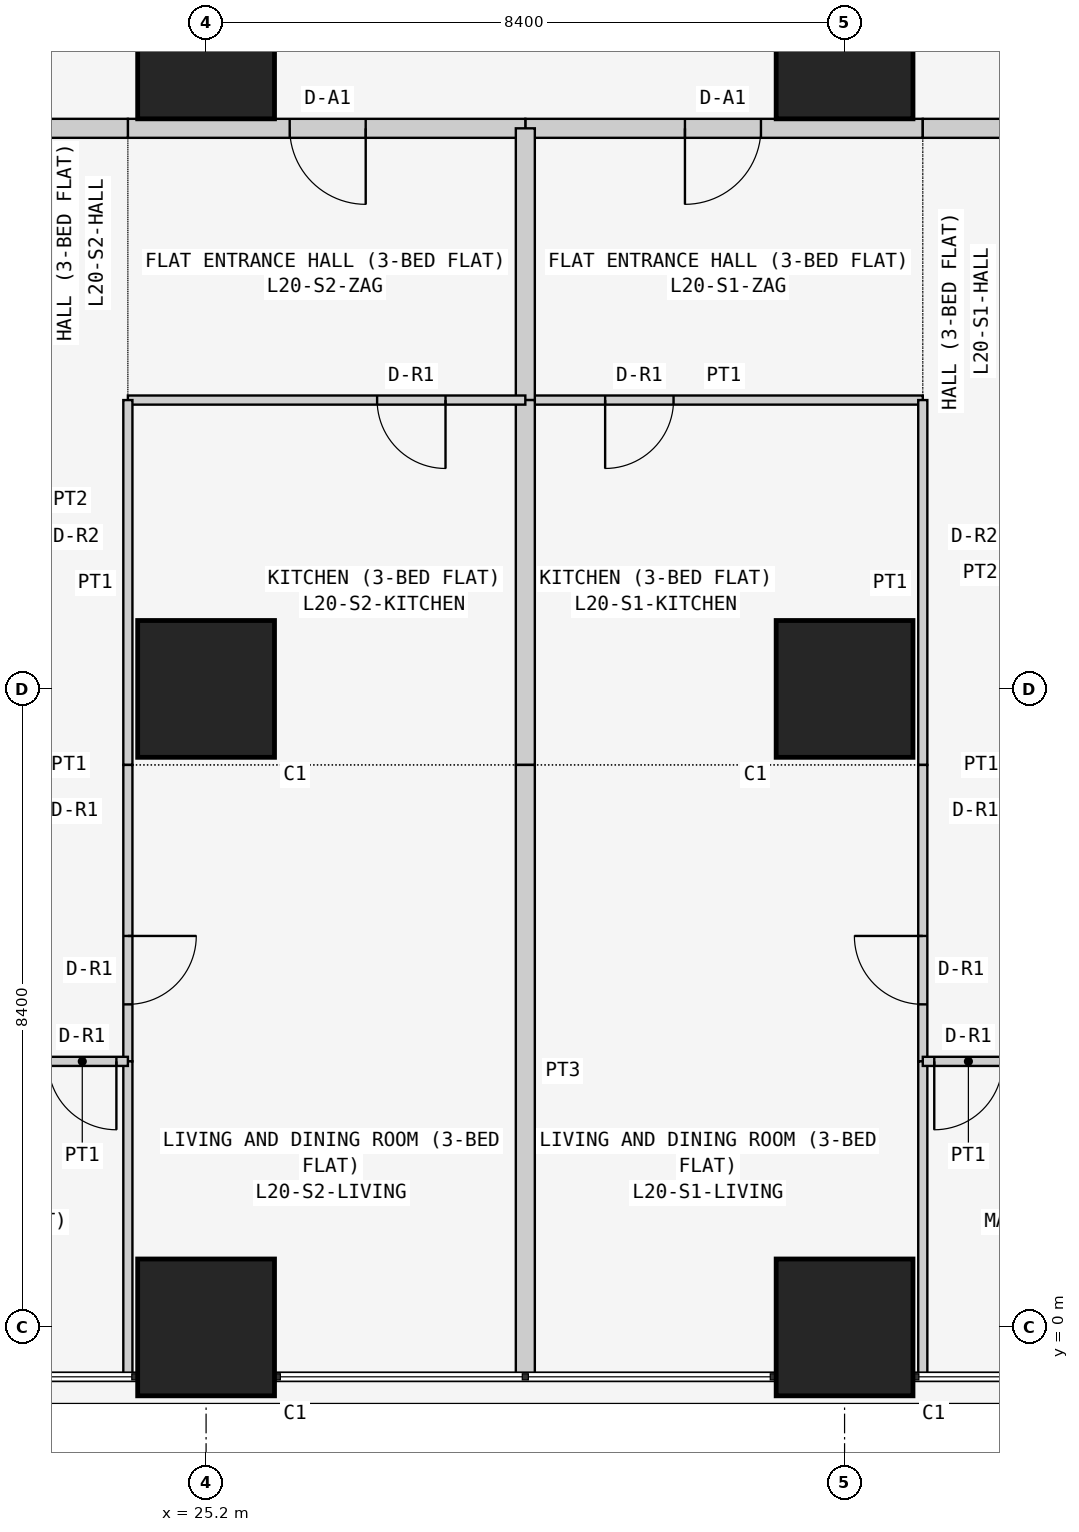
"""IFC4 building model, lengths in metres.
Left out: names, types, materials, properties, quantities, classifications, styles, units other than length and angle.
Written with IfcOpenShell. Run it as: python <this file> out.ifc"""

import sys

from ifc_helpers import new_model, si_unit, direction, frame, frame_2d, origin, origin_2d, place, context, subcontext, project, spatial, rectangle, extrude, element, fill, save


model = new_model("IFC4")
c1 = context("Model", 3, precision=1e-05, world=origin(), true_north=direction((0.0, 1.0)))
c2 = subcontext(c1, "Body", "Model", "MODEL_VIEW")
j1 = project(units=[si_unit("LENGTHUNIT", "METRE"), si_unit("PLANEANGLEUNIT", "RADIAN")], contexts=[c1])
p1 = place(None, origin())
s1 = spatial("IfcSite", under=j1, at=p1, CompositionType="ELEMENT")
p2 = place(p1, origin())
s2 = spatial("IfcBuilding", under=s1, at=p2, CompositionType="ELEMENT")
p3 = place(p2, frame((0.0, 0.0, 81.3)))
s3 = spatial("IfcBuildingStorey", under=s2, at=p3, CompositionType="ELEMENT", Elevation=81.3)
for number, where, z_axis, x_axis in (
    (1, (25.2, 0.0, 0.0), (0.0, 0.0, 1.0), (1.0, 0.0, 0.0)),
    (2, (25.2, 8.4, 0.0), (0.0, 0.0, 1.0), (1.0, 0.0, 0.0)),
    (3, (25.2, 16.8, 0.0), (0.0, 0.0, 1.0), (1.0, 0.0, 0.0)),
    (4, (33.6, 0.0, 0.0), (0.0, 0.0, 1.0), (1.0, 0.0, 0.0)),
    (5, (33.6, 8.4, 0.0), (0.0, 0.0, 1.0), (1.0, 0.0, 0.0)),
    (6, (33.6, 16.8, 0.0), (0.0, 0.0, 1.0), (1.0, 0.0, 0.0)),
):
    element("IfcColumn", number, at=place(p3, frame(where, z_axis=z_axis, x_axis=x_axis)), inside=s3, PredefinedType="COLUMN", context=c2, shape_type="SweptSolid", body=[
        extrude(rectangle(XDim=1.8, YDim=1.8, at=origin_2d()), origin(), (0.0, 0.0, 1.0), 3.6),
    ])
p4 = place(p3, frame((34.629, 15.775, 0.0), z_axis=(0.0, 0.0, 1.0), x_axis=(-1.0, 0.0, 0.0)))
e7 = element("IfcWall", 7, at=p4, inside=s3, PredefinedType="PARTITIONING", context=c2, shape_type="SweptSolid", body=[
    extrude(rectangle(XDim=5.229, YDim=0.25, at=frame_2d((2.615, 0.0))), origin(), (0.0, 0.0, 1.0), 3.45),
])
p5 = place(p4, frame((2.129, 0.0, 0.0)))
e8 = element("IfcOpeningElement", 8, at=p5, cuts=e7, PredefinedType="OPENING", context=c2, shape_type="SweptSolid", body=[
    extrude(rectangle(XDim=1.0, YDim=2.1, at=frame_2d((0.5, 1.05))), frame((0.0, 0.135, 0.0), z_axis=(0.0, -1.0, 0.0), x_axis=(1.0, 0.0, 0.0)), (0.0, 0.0, 1.0), 0.27),
])
p6 = place(p3, frame((35.829, 15.775, 0.0), z_axis=(0.0, 0.0, 1.0), x_axis=(-1.0, 0.0, 0.0)))
e9 = element("IfcWall", 9, at=p6, inside=s3, PredefinedType="PARTITIONING", context=c2, shape_type="SweptSolid", body=[
    extrude(rectangle(XDim=1.2, YDim=0.25, at=frame_2d((0.6, 0.0))), origin(), (0.0, 0.0, 1.0), 3.45),
])
p7 = place(p3, frame((29.4, 15.775, 0.0), z_axis=(0.0, 0.0, 1.0), x_axis=(-1.0, 0.0, 0.0)))
e10 = element("IfcWall", 10, at=p7, inside=s3, PredefinedType="PARTITIONING", context=c2, shape_type="SweptSolid", body=[
    extrude(rectangle(XDim=5.229, YDim=0.25, at=frame_2d((2.615, 0.0))), origin(), (0.0, 0.0, 1.0), 3.45),
])
p8 = place(p7, frame((2.1, 0.0, 0.0)))
e11 = element("IfcOpeningElement", 11, at=p8, cuts=e10, PredefinedType="OPENING", context=c2, shape_type="SweptSolid", body=[
    extrude(rectangle(XDim=1.0, YDim=2.1, at=frame_2d((0.5, 1.05))), frame((0.0, 0.135, 0.0), z_axis=(0.0, -1.0, 0.0), x_axis=(1.0, 0.0, 0.0)), (0.0, 0.0, 1.0), 0.27),
])
p9 = place(p3, frame((24.171, 15.775, 0.0), z_axis=(0.0, 0.0, 1.0), x_axis=(-1.0, 0.0, 0.0)))
e12 = element("IfcWall", 12, at=p9, inside=s3, PredefinedType="PARTITIONING", context=c2, shape_type="SweptSolid", body=[
    extrude(rectangle(XDim=1.2, YDim=0.25, at=frame_2d((0.6, 0.0))), origin(), (0.0, 0.0, 1.0), 3.45),
])
p10 = place(p3, frame((29.4, 12.2, 0.0), z_axis=(0.0, 0.0, 1.0), x_axis=(1.0, 0.0, 0.0)))
e13 = element("IfcWall", 13, at=p10, inside=s3, PredefinedType="PARTITIONING", context=c2, shape_type="SweptSolid", body=[
    extrude(rectangle(XDim=5.229, YDim=0.12, at=frame_2d((2.615, 0.0))), origin(), (0.0, 0.0, 1.0), 3.45),
])
p11 = place(p10, frame((1.05, 0.0, 0.0)))
e14 = element("IfcOpeningElement", 14, at=p11, cuts=e13, PredefinedType="OPENING", context=c2, shape_type="SweptSolid", body=[
    extrude(rectangle(XDim=0.9, YDim=2.1, at=frame_2d((0.45, 1.05))), frame((0.0, 0.07, 0.0), z_axis=(0.0, -1.0, 0.0), x_axis=(1.0, 0.0, 0.0)), (0.0, 0.0, 1.0), 0.14),
])
p12 = place(p3, frame((29.4, 15.775, 0.0), z_axis=(0.0, 0.0, 1.0), x_axis=(0.0, -1.0, 0.0)))
e15 = element("IfcWall", 15, at=p12, inside=s3, PredefinedType="PARTITIONING", context=c2, shape_type="SweptSolid", body=[
    extrude(rectangle(XDim=3.575, YDim=0.25, at=frame_2d((1.788, 0.0))), origin(), (0.0, 0.0, 1.0), 2.848),
])
p13 = place(p3, frame((34.629, 7.4, 0.0), z_axis=(0.0, 0.0, 1.0), x_axis=(0.0, 1.0, 0.0)))
e16 = element("IfcWall", 16, at=p13, inside=s3, PredefinedType="PARTITIONING", context=c2, shape_type="SweptSolid", body=[
    extrude(rectangle(XDim=4.8, YDim=0.12, at=frame_2d((2.4, 0.0))), origin(), (0.0, 0.0, 1.0), 3.45),
])
p14 = place(p3, frame((29.4, 12.2, 0.0), z_axis=(0.0, 0.0, 1.0), x_axis=(0.0, -1.0, 0.0)))
e17 = element("IfcWall", 17, at=p14, inside=s3, PredefinedType="PARTITIONING", context=c2, shape_type="SweptSolid", body=[
    extrude(rectangle(XDim=4.8, YDim=0.25, at=frame_2d((2.4, 0.0))), origin(), (0.0, 0.0, 1.0), 2.848),
])
p15 = place(p3, frame((34.629, 3.5, 0.0), z_axis=(0.0, 0.0, 1.0), x_axis=(0.0, 1.0, 0.0)))
e18 = element("IfcWall", 18, at=p15, inside=s3, PredefinedType="PARTITIONING", context=c2, shape_type="SweptSolid", body=[
    extrude(rectangle(XDim=3.9, YDim=0.12, at=frame_2d((1.95, 0.0))), origin(), (0.0, 0.0, 1.0), 3.45),
])
p16 = place(p15, frame((0.75, 0.0, 0.0)))
e19 = element("IfcOpeningElement", 19, at=p16, cuts=e18, PredefinedType="OPENING", context=c2, shape_type="SweptSolid", body=[
    extrude(rectangle(XDim=0.9, YDim=2.1, at=frame_2d((0.45, 1.05))), frame((0.0, 0.07, 0.0), z_axis=(0.0, -1.0, 0.0), x_axis=(1.0, 0.0, 0.0)), (0.0, 0.0, 1.0), 0.14),
])
p17 = place(p3, frame((34.629, -0.65, 0.0), z_axis=(0.0, 0.0, 1.0), x_axis=(0.0, 1.0, 0.0)))
e20 = element("IfcWall", 20, at=p17, inside=s3, PredefinedType="PARTITIONING", context=c2, shape_type="SweptSolid", body=[
    extrude(rectangle(XDim=4.15, YDim=0.12, at=frame_2d((2.075, 0.0))), origin(), (0.0, 0.0, 1.0), 3.45),
])
p18 = place(p3, frame((29.4, 7.4, 0.0), z_axis=(0.0, 0.0, 1.0), x_axis=(0.0, -1.0, 0.0)))
e21 = element("IfcWall", 21, at=p18, inside=s3, PredefinedType="PARTITIONING", context=c2, shape_type="SweptSolid", body=[
    extrude(rectangle(XDim=8.05, YDim=0.25, at=frame_2d((4.025, 0.0))), origin(), (0.0, 0.0, 1.0), 2.848),
])
p19 = place(p3, frame((34.629, 3.5, 0.0), z_axis=(0.0, 0.0, 1.0), x_axis=(1.0, 0.0, 0.0)))
e22 = element("IfcWall", 22, at=p19, inside=s3, PredefinedType="PARTITIONING", context=c2, shape_type="SweptSolid", body=[
    extrude(rectangle(XDim=1.2, YDim=0.12, at=frame_2d((0.6, 0.0))), origin(), (0.0, 0.0, 1.0), 3.45),
])
p20 = place(p19, frame((0.151, 0.0, 0.0)))
e23 = element("IfcOpeningElement", 23, at=p20, cuts=e22, PredefinedType="OPENING", context=c2, shape_type="SweptSolid", body=[
    extrude(rectangle(XDim=0.9, YDim=2.1, at=frame_2d((0.45, 1.05))), frame((0.0, 0.07, 0.0), z_axis=(0.0, -1.0, 0.0), x_axis=(1.0, 0.0, 0.0)), (0.0, 0.0, 1.0), 0.14),
])
p21 = place(p3, frame((29.4, 12.2, 0.0), z_axis=(0.0, 0.0, 1.0), x_axis=(-1.0, 0.0, 0.0)))
e24 = element("IfcWall", 24, at=p21, inside=s3, PredefinedType="PARTITIONING", context=c2, shape_type="SweptSolid", body=[
    extrude(rectangle(XDim=5.229, YDim=0.12, at=frame_2d((2.615, 0.0))), origin(), (0.0, 0.0, 1.0), 3.45),
])
p22 = place(p21, frame((1.05, 0.0, 0.0)))
e25 = element("IfcOpeningElement", 25, at=p22, cuts=e24, PredefinedType="OPENING", context=c2, shape_type="SweptSolid", body=[
    extrude(rectangle(XDim=0.9, YDim=2.1, at=frame_2d((0.45, 1.05))), frame((0.0, 0.07, 0.0), z_axis=(0.0, -1.0, 0.0), x_axis=(1.0, 0.0, 0.0)), (0.0, 0.0, 1.0), 0.14),
])
p23 = place(p3, frame((24.171, 7.4, 0.0), z_axis=(0.0, 0.0, 1.0), x_axis=(0.0, 1.0, 0.0)))
e26 = element("IfcWall", 26, at=p23, inside=s3, PredefinedType="PARTITIONING", context=c2, shape_type="SweptSolid", body=[
    extrude(rectangle(XDim=4.8, YDim=0.12, at=frame_2d((2.4, 0.0))), origin(), (0.0, 0.0, 1.0), 3.45),
])
p24 = place(p3, frame((24.171, 3.5, 0.0), z_axis=(0.0, 0.0, 1.0), x_axis=(0.0, 1.0, 0.0)))
e27 = element("IfcWall", 27, at=p24, inside=s3, PredefinedType="PARTITIONING", context=c2, shape_type="SweptSolid", body=[
    extrude(rectangle(XDim=3.9, YDim=0.12, at=frame_2d((1.95, 0.0))), origin(), (0.0, 0.0, 1.0), 3.45),
])
p25 = place(p24, frame((0.75, 0.0, 0.0)))
e28 = element("IfcOpeningElement", 28, at=p25, cuts=e27, PredefinedType="OPENING", context=c2, shape_type="SweptSolid", body=[
    extrude(rectangle(XDim=0.9, YDim=2.1, at=frame_2d((0.45, 1.05))), frame((0.0, 0.07, 0.0), z_axis=(0.0, -1.0, 0.0), x_axis=(1.0, 0.0, 0.0)), (0.0, 0.0, 1.0), 0.14),
])
p26 = place(p3, frame((24.171, -0.65, 0.0), z_axis=(0.0, 0.0, 1.0), x_axis=(0.0, 1.0, 0.0)))
e29 = element("IfcWall", 29, at=p26, inside=s3, PredefinedType="PARTITIONING", context=c2, shape_type="SweptSolid", body=[
    extrude(rectangle(XDim=4.15, YDim=0.12, at=frame_2d((2.075, 0.0))), origin(), (0.0, 0.0, 1.0), 3.45),
])
p27 = place(p3, frame((24.171, 3.5, 0.0), z_axis=(0.0, 0.0, 1.0), x_axis=(-1.0, 0.0, 0.0)))
e30 = element("IfcWall", 30, at=p27, inside=s3, PredefinedType="PARTITIONING", context=c2, shape_type="SweptSolid", body=[
    extrude(rectangle(XDim=1.2, YDim=0.12, at=frame_2d((0.6, 0.0))), origin(), (0.0, 0.0, 1.0), 3.45),
])
p28 = place(p27, frame((0.151, 0.0, 0.0)))
e31 = element("IfcOpeningElement", 31, at=p28, cuts=e30, PredefinedType="OPENING", context=c2, shape_type="SweptSolid", body=[
    extrude(rectangle(XDim=0.9, YDim=2.1, at=frame_2d((0.45, 1.05))), frame((0.0, 0.07, 0.0), z_axis=(0.0, -1.0, 0.0), x_axis=(1.0, 0.0, 0.0)), (0.0, 0.0, 1.0), 0.14),
])
p29 = place(p5, origin())
e32 = element("IfcDoor", 32, at=p29, inside=s3, OperationType="SINGLE_SWING_RIGHT", PredefinedType="DOOR", context=c2, shape_type="SweptSolid", body=[
    extrude(rectangle(XDim=1.0, YDim=2.1, at=frame_2d((0.5, 1.05))), frame((0.0, 0.025, 0.0), z_axis=(0.0, -1.0, 0.0), x_axis=(1.0, 0.0, 0.0)), (0.0, 0.0, 1.0), 0.05),
])
fill(e8, e32)
p30 = place(p11, frame((0.9, 0.0, 0.0), z_axis=(0.0, 0.0, 1.0), x_axis=(-1.0, 0.0, 0.0)))
e33 = element("IfcDoor", 33, at=p30, inside=s3, OperationType="SINGLE_SWING_RIGHT", PredefinedType="DOOR", context=c2, shape_type="SweptSolid", body=[
    extrude(rectangle(XDim=0.9, YDim=2.1, at=frame_2d((0.45, 1.05))), frame((0.0, 0.025, 0.0), z_axis=(0.0, -1.0, 0.0), x_axis=(1.0, 0.0, 0.0)), (0.0, 0.0, 1.0), 0.05),
])
fill(e14, e33)
p31 = place(p16, origin())
e34 = element("IfcDoor", 34, at=p31, inside=s3, OperationType="SINGLE_SWING_RIGHT", PredefinedType="DOOR", context=c2, shape_type="SweptSolid", body=[
    extrude(rectangle(XDim=0.9, YDim=2.1, at=frame_2d((0.45, 1.05))), frame((0.0, 0.025, 0.0), z_axis=(0.0, -1.0, 0.0), x_axis=(1.0, 0.0, 0.0)), (0.0, 0.0, 1.0), 0.05),
])
fill(e19, e34)
p32 = place(p20, frame((0.9, 0.0, 0.0), z_axis=(0.0, 0.0, 1.0), x_axis=(-1.0, 0.0, 0.0)))
e35 = element("IfcDoor", 35, at=p32, inside=s3, OperationType="SINGLE_SWING_RIGHT", PredefinedType="DOOR", context=c2, shape_type="SweptSolid", body=[
    extrude(rectangle(XDim=0.9, YDim=2.1, at=frame_2d((0.45, 1.05))), frame((0.0, 0.025, 0.0), z_axis=(0.0, -1.0, 0.0), x_axis=(1.0, 0.0, 0.0)), (0.0, 0.0, 1.0), 0.05),
])
fill(e23, e35)
p33 = place(p8, origin())
e36 = element("IfcDoor", 36, at=p33, inside=s3, OperationType="SINGLE_SWING_LEFT", PredefinedType="DOOR", context=c2, shape_type="SweptSolid", body=[
    extrude(rectangle(XDim=1.0, YDim=2.1, at=frame_2d((0.5, 1.05))), frame((0.0, 0.025, 0.0), z_axis=(0.0, -1.0, 0.0), x_axis=(1.0, 0.0, 0.0)), (0.0, 0.0, 1.0), 0.05),
])
fill(e11, e36)
p34 = place(p22, origin())
e37 = element("IfcDoor", 37, at=p34, inside=s3, OperationType="SINGLE_SWING_LEFT", PredefinedType="DOOR", context=c2, shape_type="SweptSolid", body=[
    extrude(rectangle(XDim=0.9, YDim=2.1, at=frame_2d((0.45, 1.05))), frame((0.0, 0.025, 0.0), z_axis=(0.0, -1.0, 0.0), x_axis=(1.0, 0.0, 0.0)), (0.0, 0.0, 1.0), 0.05),
])
fill(e25, e37)
p35 = place(p25, frame((0.9, 0.0, 0.0), z_axis=(0.0, 0.0, 1.0), x_axis=(-1.0, 0.0, 0.0)))
e38 = element("IfcDoor", 38, at=p35, inside=s3, OperationType="SINGLE_SWING_LEFT", PredefinedType="DOOR", context=c2, shape_type="SweptSolid", body=[
    extrude(rectangle(XDim=0.9, YDim=2.1, at=frame_2d((0.45, 1.05))), frame((0.0, 0.025, 0.0), z_axis=(0.0, -1.0, 0.0), x_axis=(1.0, 0.0, 0.0)), (0.0, 0.0, 1.0), 0.05),
])
fill(e28, e38)
p36 = place(p28, origin())
e39 = element("IfcDoor", 39, at=p36, inside=s3, OperationType="SINGLE_SWING_LEFT", PredefinedType="DOOR", context=c2, shape_type="SweptSolid", body=[
    extrude(rectangle(XDim=0.9, YDim=2.1, at=frame_2d((0.45, 1.05))), frame((0.0, 0.025, 0.0), z_axis=(0.0, -1.0, 0.0), x_axis=(1.0, 0.0, 0.0)), (0.0, 0.0, 1.0), 0.05),
])
fill(e31, e39)
save(model, sys.argv[1])
